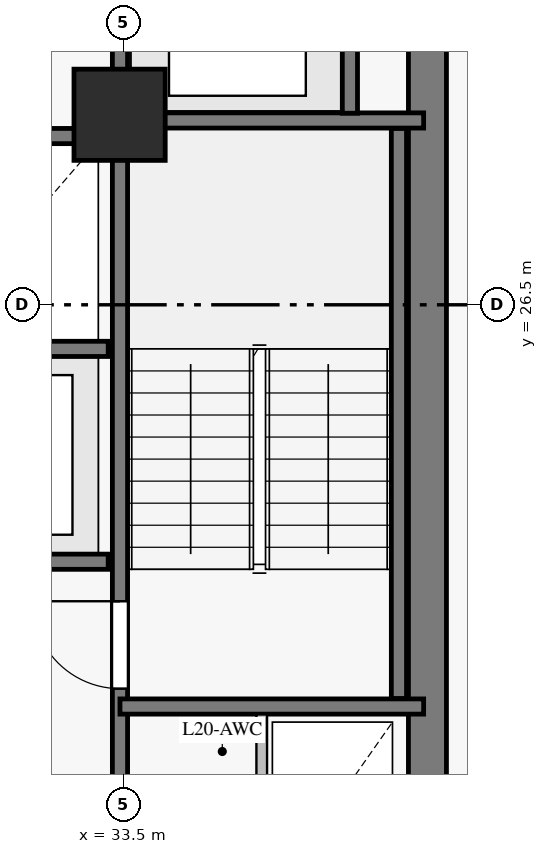
"""IFC4 building model, lengths in metres.
Left out: names, types, materials, properties, quantities, classifications, styles, units other than length and angle.
Written with IfcOpenShell. Run it as: python <this file> out.ifc"""

import sys

from ifc_helpers import new_model, si_unit, direction, frame, frame_2d, origin, origin_with_axes, origin_2d, place, context, subcontext, project, spatial, rectangle, extrude, source, transform, mapped, element, fill, save


model = new_model("IFC4")
c1 = context("Model", 3, precision=1e-05, world=origin(), true_north=direction((0.0, 1.0)))
c2 = subcontext(c1, "Body", "Model", "MODEL_VIEW")
j1 = project(units=[si_unit("LENGTHUNIT", "METRE"), si_unit("PLANEANGLEUNIT", "RADIAN")], contexts=[c1])
p1 = place(None, origin())
s1 = spatial("IfcSite", under=j1, at=p1, CompositionType="ELEMENT")
p2 = place(p1, origin())
s2 = spatial("IfcBuilding", under=s1, at=p2, CompositionType="ELEMENT")
p3 = place(p2, frame((0.0, 0.0, 76.9)))
s3 = spatial("IfcBuildingStorey", under=s2, at=p3, CompositionType="ELEMENT", Elevation=76.9)
p4 = place(p3, frame((37.5, 18.3, 0.0), z_axis=(0.0, 0.0, 1.0), x_axis=(0.0, 1.0, 0.0)))
e1 = element("IfcWall", 1, at=p4, inside=s3, PredefinedType="SHEAR", context=c2, shape_type="SweptSolid", body=[
    extrude(rectangle(XDim=16.4, YDim=0.5, at=frame_2d((8.2, 0.0))), origin(), (0.0, 0.0, 1.0), 3.35),
])
p5 = place(p4, frame((14.06, 0.0, 0.0)))
e2 = element("IfcOpeningElement", 2, at=p5, cuts=e1, PredefinedType="OPENING", context=c2, shape_type="SweptSolid", body=[
    extrude(rectangle(XDim=1.2, YDim=2.15, at=frame_2d((0.6, 1.075))), frame((0.0, 0.26, 0.0), z_axis=(0.0, -1.0, 0.0), x_axis=(1.0, 0.0, 0.0)), (0.0, 0.0, 1.0), 0.52),
])
m1 = source(origin_with_axes(), c2, "Body", "SweptSolid", [
    extrude(rectangle(XDim=1.2, YDim=1.2, at=origin_2d()), origin(), (0.0, 0.0, 1.0), 3.6),
])
p6 = place(p3, frame((33.45, 29.0, 0.0), z_axis=(0.0, 0.0, 1.0), x_axis=(1.0, 0.0, 0.0)))
e3 = element("IfcColumn", 3, at=p6, inside=s3, PredefinedType="COLUMN", context=c2, shape_type="MappedRepresentation", body=[
    mapped(m1, transform((0.0, 0.0, 0.0), scale=1.0)),
])
p7 = place(p3, frame((33.455, 18.7, 0.0), z_axis=(0.0, 0.0, 1.0), x_axis=(0.0, 1.0, 0.0)))
e4 = element("IfcWall", 4, at=p7, inside=s3, PredefinedType="SHEAR", context=c2, shape_type="SweptSolid", body=[
    extrude(rectangle(XDim=15.6, YDim=0.2, at=frame_2d((7.8, 0.0))), origin(), (0.0, 0.0, 1.0), 3.35),
])
p8 = place(p7, frame((2.75, 0.0, 0.0)))
e5 = element("IfcOpeningElement", 5, at=p8, cuts=e4, PredefinedType="OPENING", context=c2, shape_type="SweptSolid", body=[
    extrude(rectangle(XDim=1.15, YDim=2.15, at=frame_2d((0.575, 1.075))), frame((0.0, 0.11, 0.0), z_axis=(0.0, -1.0, 0.0), x_axis=(1.0, 0.0, 0.0)), (0.0, 0.0, 1.0), 0.22),
])
p9 = place(p7, frame((0.55, 0.0, 0.0)))
e6 = element("IfcOpeningElement", 6, at=p9, cuts=e4, PredefinedType="OPENING", context=c2, shape_type="SweptSolid", body=[
    extrude(rectangle(XDim=0.94, YDim=2.1, at=frame_2d((0.47, 1.05))), frame((0.0, 0.11, 0.0), z_axis=(0.0, -1.0, 0.0), x_axis=(1.0, 0.0, 0.0)), (0.0, 0.0, 1.0), 0.22),
])
p10 = place(p3, frame((23.7, 23.12, 0.0), z_axis=(0.0, 0.0, 1.0), x_axis=(1.0, 0.0, 0.0)))
e7 = element("IfcWall", 7, at=p10, inside=s3, PredefinedType="SHEAR", context=c2, shape_type="SweptSolid", body=[
    extrude(rectangle(XDim=9.6, YDim=0.2, at=frame_2d((4.8, 0.0))), origin(), (0.0, 0.0, 1.0), 3.35),
])
p11 = place(p10, frame((0.6, 0.0, 0.0)))
e8 = element("IfcOpeningElement", 8, at=p11, cuts=e7, PredefinedType="OPENING", context=c2, shape_type="SweptSolid", body=[
    extrude(rectangle(XDim=1.1, YDim=2.15, at=frame_2d((0.55, 1.075))), frame((0.0, 0.11, 0.0), z_axis=(0.0, -1.0, 0.0), x_axis=(1.0, 0.0, 0.0)), (0.0, 0.0, 1.0), 0.22),
])
p12 = place(p10, frame((2.98, 0.0, 0.0)))
e9 = element("IfcOpeningElement", 9, at=p12, cuts=e7, PredefinedType="OPENING", context=c2, shape_type="SweptSolid", body=[
    extrude(rectangle(XDim=1.1, YDim=2.15, at=frame_2d((0.55, 1.075))), frame((0.0, 0.11, 0.0), z_axis=(0.0, -1.0, 0.0), x_axis=(1.0, 0.0, 0.0)), (0.0, 0.0, 1.0), 0.22),
])
p13 = place(p10, frame((5.36, 0.0, 0.0)))
e10 = element("IfcOpeningElement", 10, at=p13, cuts=e7, PredefinedType="OPENING", context=c2, shape_type="SweptSolid", body=[
    extrude(rectangle(XDim=1.1, YDim=2.15, at=frame_2d((0.55, 1.075))), frame((0.0, 0.11, 0.0), z_axis=(0.0, -1.0, 0.0), x_axis=(1.0, 0.0, 0.0)), (0.0, 0.0, 1.0), 0.22),
])
p14 = place(p10, frame((7.74, 0.0, 0.0)))
e11 = element("IfcOpeningElement", 11, at=p14, cuts=e7, PredefinedType="OPENING", context=c2, shape_type="SweptSolid", body=[
    extrude(rectangle(XDim=1.1, YDim=2.15, at=frame_2d((0.55, 1.075))), frame((0.0, 0.11, 0.0), z_axis=(0.0, -1.0, 0.0), x_axis=(1.0, 0.0, 0.0)), (0.0, 0.0, 1.0), 0.22),
])
for number, where, z_axis, x_axis in (
    (12, (23.7, 25.92, 0.0), (0.0, 0.0, 1.0), (1.0, 0.0, 0.0)),
    (13, (23.7, 28.72, 0.0), (0.0, 0.0, 1.0), (1.0, 0.0, 0.0)),
):
    element("IfcWall", number, at=place(p3, frame(where, z_axis=z_axis, x_axis=x_axis)), inside=s3, PredefinedType="SHEAR", context=c2, shape_type="SweptSolid", body=[
        extrude(rectangle(XDim=9.6, YDim=0.2, at=frame_2d((4.8, 0.0))), origin(), (0.0, 0.0, 1.0), 3.35),
    ])
p15 = place(p3, frame((37.125, 21.32, 0.0), z_axis=(0.0, 0.0, 1.0), x_axis=(0.0, 1.0, 0.0)))
e14 = element("IfcWall", 14, at=p15, inside=s3, PredefinedType="SHEAR", context=c2, shape_type="SweptSolid", body=[
    extrude(rectangle(XDim=7.5, YDim=0.2, at=frame_2d((3.75, 0.0))), origin(), (0.0, 0.0, 1.0), 3.35),
])
for number, where, z_axis, x_axis in (
    (15, (33.455, 21.215, 0.0), (0.0, 0.0, 1.0), (1.0, 0.0, 0.0)),
    (16, (33.455, 28.925, 0.0), (0.0, 0.0, 1.0), (1.0, 0.0, 0.0)),
):
    element("IfcWall", number, at=place(p3, frame(where, z_axis=z_axis, x_axis=x_axis)), inside=s3, PredefinedType="SHEAR", context=c2, shape_type="SweptSolid", body=[
        extrude(rectangle(XDim=3.995, YDim=0.2, at=frame_2d((1.998, 0.0))), origin(), (0.0, 0.0, 1.0), 3.35),
    ])
p16 = place(p3, frame((36.48, 29.02, 0.0), z_axis=(0.0, 0.0, 1.0), x_axis=(0.0, 1.0, 0.0)))
e17 = element("IfcWall", 17, at=p16, inside=s3, PredefinedType="SHEAR", context=c2, shape_type="SweptSolid", body=[
    extrude(rectangle(XDim=2.86, YDim=0.2, at=frame_2d((1.43, 0.0))), origin(), (0.0, 0.0, 1.0), 3.35),
])
p17 = place(p3, frame((35.32, 18.557, 0.0), z_axis=(0.0, 0.0, 1.0), x_axis=(0.0, 1.0, 0.0)))
e18 = element("IfcWall", 18, at=p17, inside=s3, PredefinedType="PARTITIONING", context=c2, shape_type="SweptSolid", body=[
    extrude(rectangle(XDim=2.553, YDim=0.14, at=frame_2d((1.277, 0.0))), origin(), (0.0, 0.0, 1.0), 3.35),
])
m2 = source(origin_with_axes(), c2, "Body", "SweptSolid", [
    extrude(rectangle(XDim=1.15, YDim=2.15, at=frame_2d((0.575, 1.075))), frame((0.0, 0.025, 0.0), z_axis=(0.0, -1.0, 0.0), x_axis=(1.0, 0.0, 0.0)), (0.0, 0.0, 1.0), 0.05),
])
p18 = place(p8, origin())
e19 = element("IfcDoor", 19, at=p18, inside=s3, OperationType="SINGLE_SWING_RIGHT", PredefinedType="DOOR", context=c2, shape_type="MappedRepresentation", body=[
    mapped(m2, transform((0.0, 0.0, 0.0), scale=1.0)),
])
fill(e5, e19)
save(model, sys.argv[1])
